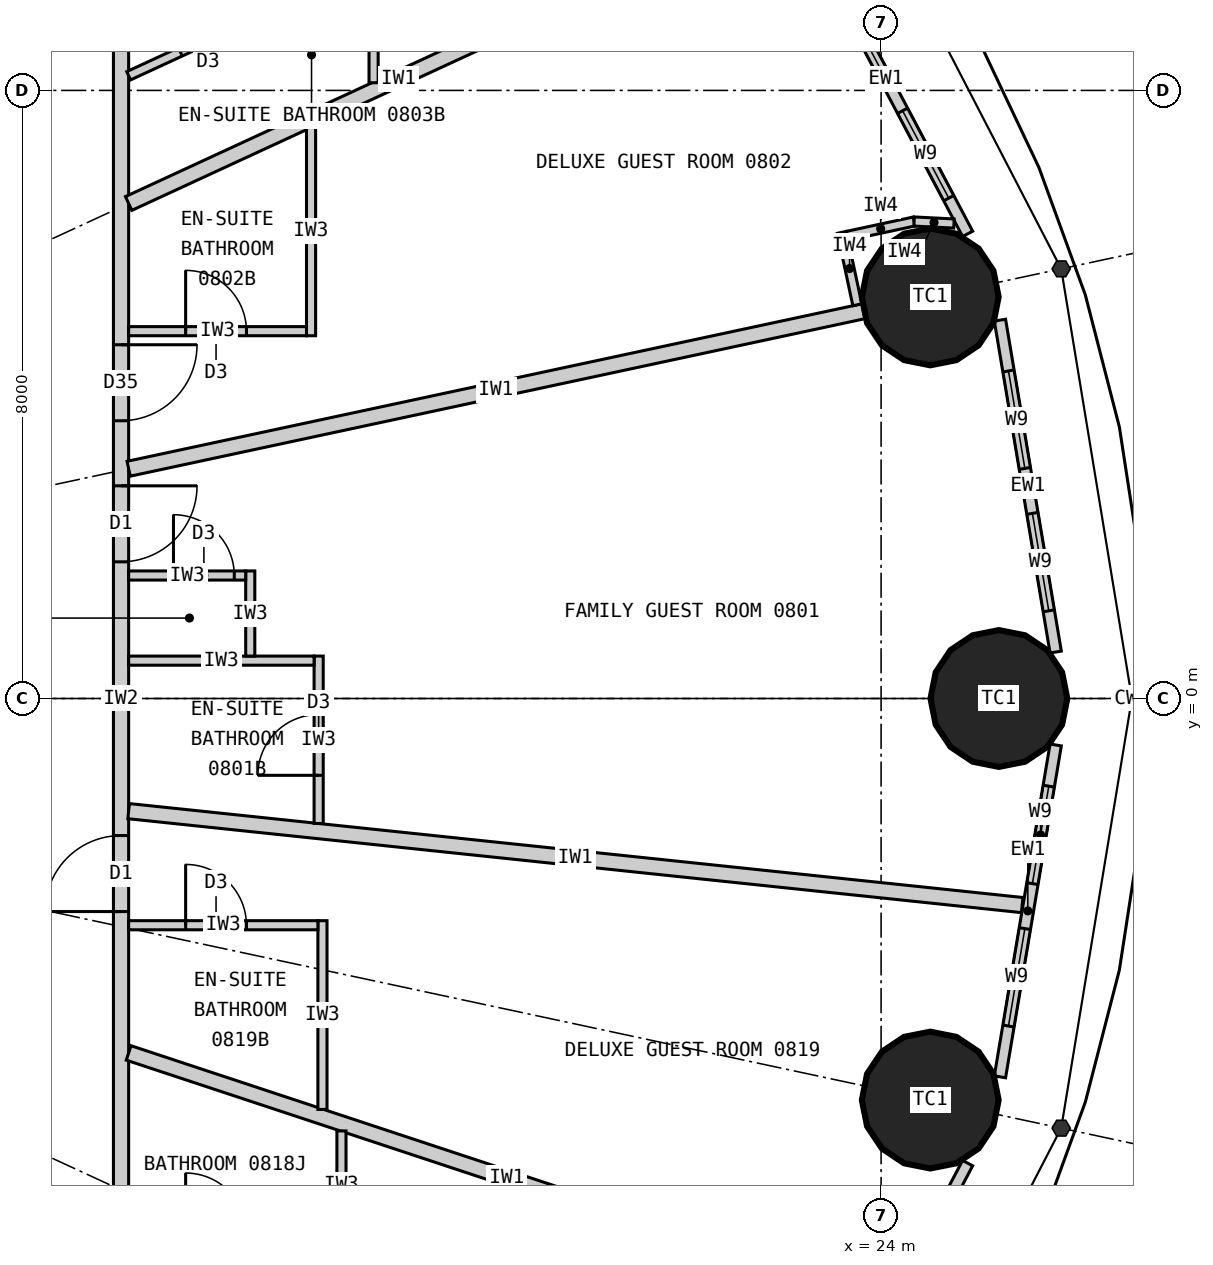
"""IFC4 building model, lengths in metres.
Left out: names, types, materials, properties, quantities, classifications, styles, units other than length and angle.
Written with IfcOpenShell. Run it as: python <this file> out.ifc"""

import sys

from ifc_helpers import new_model, si_unit, direction, frame, frame_2d, origin, origin_2d, place, context, subcontext, project, spatial, rectangle, circle, extrude, element, fill, save


model = new_model("IFC4")
c1 = context("Model", 3, precision=1e-05, world=origin(), true_north=direction((0.0, 1.0)))
c2 = subcontext(c1, "Body", "Model", "MODEL_VIEW")
j1 = project(units=[si_unit("LENGTHUNIT", "METRE"), si_unit("PLANEANGLEUNIT", "RADIAN")], contexts=[c1])
p1 = place(None, origin())
s1 = spatial("IfcSite", under=j1, at=p1, CompositionType="ELEMENT")
p2 = place(p1, origin())
s2 = spatial("IfcBuilding", under=s1, at=p2, CompositionType="ELEMENT")
p3 = place(p2, frame((0.0, 0.0, 39.3)))
s3 = spatial("IfcBuildingStorey", under=s2, at=p3, CompositionType="ELEMENT", Elevation=39.3)
for number, where, z_axis, x_axis in (
    (1, (25.55, 0.0, 0.0), (0.0, 0.0, 1.0), (1.0, 0.0, 0.0)),
    (2, (24.647, 5.283, 0.0), (0.0, 0.0, 1.0), (1.0, 0.0, 0.0)),
    (3, (24.647, -5.283, 0.0), (0.0, 0.0, 1.0), (1.0, 0.0, 0.0)),
):
    element("IfcColumn", number, at=place(p3, frame(where, z_axis=z_axis, x_axis=x_axis)), inside=s3, PredefinedType="COLUMN", context=c2, shape_type="SweptSolid", body=[
        extrude(circle(Radius=0.9, at=origin_2d()), origin(), (0.0, 0.0, 1.0), 3.3),
    ])
p4 = place(p3, frame((26.297, 0.611, 0.0), z_axis=(0.0, 0.0, 1.0), x_axis=(-0.165641751141, 0.986185991727, 0.0)))
e4 = element("IfcWall", 4, at=p4, inside=s3, PredefinedType="ELEMENTEDWALL", context=c2, shape_type="SweptSolid", body=[
    extrude(rectangle(XDim=4.428, YDim=0.15, at=frame_2d((2.214, 0.0))), origin(), (0.0, 0.0, 1.0), 3.12),
])
p5 = place(p4, frame((0.55, 0.0, 0.9)))
e5 = element("IfcOpeningElement", 5, at=p5, cuts=e4, PredefinedType="OPENING", context=c2, shape_type="SweptSolid", body=[
    extrude(rectangle(XDim=1.3, YDim=1.9, at=frame_2d((0.65, 0.95))), frame((0.0, 0.085, 0.0), z_axis=(0.0, -1.0, 0.0), x_axis=(1.0, 0.0, 0.0)), (0.0, 0.0, 1.0), 0.17),
])
p6 = place(p4, frame((2.45, 0.0, 0.9)))
e6 = element("IfcOpeningElement", 6, at=p6, cuts=e4, PredefinedType="OPENING", context=c2, shape_type="SweptSolid", body=[
    extrude(rectangle(XDim=1.3, YDim=1.9, at=frame_2d((0.65, 0.95))), frame((0.0, 0.085, 0.0), z_axis=(0.0, -1.0, 0.0), x_axis=(1.0, 0.0, 0.0)), (0.0, 0.0, 1.0), 0.17),
])
p7 = place(p3, frame((25.139, 6.113, 0.0), z_axis=(0.0, 0.0, 1.0), x_axis=(-0.467303182954, 0.884097129959, 0.0)))
e7 = element("IfcWall", 7, at=p7, inside=s3, PredefinedType="ELEMENTEDWALL", context=c2, shape_type="SweptSolid", body=[
    extrude(rectangle(XDim=4.606, YDim=0.15, at=frame_2d((2.303, 0.0))), origin(), (0.0, 0.0, 1.0), 3.12),
])
p8 = place(p7, frame((0.531, 0.0, 0.9)))
e8 = element("IfcOpeningElement", 8, at=p8, cuts=e7, PredefinedType="OPENING", context=c2, shape_type="SweptSolid", body=[
    extrude(rectangle(XDim=1.3, YDim=1.9, at=frame_2d((0.65, 0.95))), frame((0.0, 0.085, 0.0), z_axis=(0.0, -1.0, 0.0), x_axis=(1.0, 0.0, 0.0)), (0.0, 0.0, 1.0), 0.17),
])
p9 = place(p7, frame((2.432, 0.0, 0.9)))
e9 = element("IfcOpeningElement", 9, at=p9, cuts=e7, PredefinedType="OPENING", context=c2, shape_type="SweptSolid", body=[
    extrude(rectangle(XDim=1.3, YDim=1.9, at=frame_2d((0.65, 0.95))), frame((0.0, 0.085, 0.0), z_axis=(0.0, -1.0, 0.0), x_axis=(1.0, 0.0, 0.0)), (0.0, 0.0, 1.0), 0.17),
])
p10 = place(p3, frame((22.986, -10.185, 0.0), z_axis=(0.0, 0.0, 1.0), x_axis=(0.467303182954, 0.884097129959, 0.0)))
e10 = element("IfcWall", 10, at=p10, inside=s3, PredefinedType="ELEMENTEDWALL", context=c2, shape_type="SweptSolid", body=[
    extrude(rectangle(XDim=4.606, YDim=0.15, at=frame_2d((2.303, 0.0))), origin(), (0.0, 0.0, 1.0), 3.12),
])
p11 = place(p10, frame((0.875, 0.0, 0.9)))
e11 = element("IfcOpeningElement", 11, at=p11, cuts=e10, PredefinedType="OPENING", context=c2, shape_type="SweptSolid", body=[
    extrude(rectangle(XDim=1.3, YDim=1.9, at=frame_2d((0.65, 0.95))), frame((0.0, 0.085, 0.0), z_axis=(0.0, -1.0, 0.0), x_axis=(1.0, 0.0, 0.0)), (0.0, 0.0, 1.0), 0.17),
])
p12 = place(p10, frame((2.775, 0.0, 0.9)))
e12 = element("IfcOpeningElement", 12, at=p12, cuts=e10, PredefinedType="OPENING", context=c2, shape_type="SweptSolid", body=[
    extrude(rectangle(XDim=1.3, YDim=1.9, at=frame_2d((0.65, 0.95))), frame((0.0, 0.085, 0.0), z_axis=(0.0, -1.0, 0.0), x_axis=(1.0, 0.0, 0.0)), (0.0, 0.0, 1.0), 0.17),
])
p13 = place(p3, frame((25.564, -4.978, 0.0), z_axis=(0.0, 0.0, 1.0), x_axis=(0.165641751141, 0.986185991727, 0.0)))
e13 = element("IfcWall", 13, at=p13, inside=s3, PredefinedType="ELEMENTEDWALL", context=c2, shape_type="SweptSolid", body=[
    extrude(rectangle(XDim=4.428, YDim=0.15, at=frame_2d((2.214, 0.0))), origin(), (0.0, 0.0, 1.0), 3.12),
])
p14 = place(p13, frame((0.678, 0.0, 0.9)))
e14 = element("IfcOpeningElement", 14, at=p14, cuts=e13, PredefinedType="OPENING", context=c2, shape_type="SweptSolid", body=[
    extrude(rectangle(XDim=1.3, YDim=1.9, at=frame_2d((0.65, 0.95))), frame((0.0, 0.085, 0.0), z_axis=(0.0, -1.0, 0.0), x_axis=(1.0, 0.0, 0.0)), (0.0, 0.0, 1.0), 0.17),
])
p15 = place(p13, frame((2.578, 0.0, 0.9)))
e15 = element("IfcOpeningElement", 15, at=p15, cuts=e13, PredefinedType="OPENING", context=c2, shape_type="SweptSolid", body=[
    extrude(rectangle(XDim=1.3, YDim=1.9, at=frame_2d((0.65, 0.95))), frame((0.0, 0.085, 0.0), z_axis=(0.0, -1.0, 0.0), x_axis=(1.0, 0.0, 0.0)), (0.0, 0.0, 1.0), 0.17),
])
p16 = place(p3, frame((14.0, -9.9, 0.0), z_axis=(0.0, 0.0, 1.0), x_axis=(0.0, 1.0, 0.0)))
e16 = element("IfcWall", 16, at=p16, inside=s3, PredefinedType="PARTITIONING", context=c2, shape_type="SweptSolid", body=[
    extrude(rectangle(XDim=19.8, YDim=0.2, at=frame_2d((9.9, 0.0))), origin(), (0.0, 0.0, 1.0), 3.12),
])
p17 = place(p16, frame((11.698, 0.0, 0.0)))
e17 = element("IfcOpeningElement", 17, at=p17, cuts=e16, PredefinedType="OPENING", context=c2, shape_type="SweptSolid", body=[
    extrude(rectangle(XDim=1.0, YDim=2.2, at=frame_2d((0.5, 1.1))), frame((0.0, 0.11, 0.0), z_axis=(0.0, -1.0, 0.0), x_axis=(1.0, 0.0, 0.0)), (0.0, 0.0, 1.0), 0.22),
])
p18 = place(p16, frame((13.554, 0.0, 0.0)))
e18 = element("IfcOpeningElement", 18, at=p18, cuts=e16, PredefinedType="OPENING", context=c2, shape_type="SweptSolid", body=[
    extrude(rectangle(XDim=1.0, YDim=2.0, at=frame_2d((0.5, 1.0))), frame((0.0, 0.11, 0.0), z_axis=(0.0, -1.0, 0.0), x_axis=(1.0, 0.0, 0.0)), (0.0, 0.0, 1.0), 0.22),
])
p19 = place(p16, frame((18.698, 0.0, 0.0)))
e19 = element("IfcOpeningElement", 19, at=p19, cuts=e16, PredefinedType="OPENING", context=c2, shape_type="SweptSolid", body=[
    extrude(rectangle(XDim=1.0, YDim=2.2, at=frame_2d((0.5, 1.1))), frame((0.0, 0.11, 0.0), z_axis=(0.0, -1.0, 0.0), x_axis=(1.0, 0.0, 0.0)), (0.0, 0.0, 1.0), 0.22),
])
p20 = place(p16, frame((0.975, 0.0, 0.0)))
e20 = element("IfcOpeningElement", 20, at=p20, cuts=e16, PredefinedType="OPENING", context=c2, shape_type="SweptSolid", body=[
    extrude(rectangle(XDim=1.0, YDim=2.2, at=frame_2d((0.5, 1.1))), frame((0.0, 0.11, 0.0), z_axis=(0.0, -1.0, 0.0), x_axis=(1.0, 0.0, 0.0)), (0.0, 0.0, 1.0), 0.22),
])
p21 = place(p16, frame((7.097, 0.0, 0.0)))
e21 = element("IfcOpeningElement", 21, at=p21, cuts=e16, PredefinedType="OPENING", context=c2, shape_type="SweptSolid", body=[
    extrude(rectangle(XDim=1.0, YDim=2.2, at=frame_2d((0.5, 1.1))), frame((0.0, 0.11, 0.0), z_axis=(0.0, -1.0, 0.0), x_axis=(1.0, 0.0, 0.0)), (0.0, 0.0, 1.0), 0.22),
])
p22 = place(p3, frame((14.1, 3.022, 0.0), z_axis=(0.0, 0.0, 1.0), x_axis=(0.977786510688, 0.209603290805, 0.0)))
e22 = element("IfcWall", 22, at=p22, inside=s3, PredefinedType="PARTITIONING", context=c2, shape_type="SweptSolid", body=[
    extrude(rectangle(XDim=9.887, YDim=0.2, at=frame_2d((4.943, 0.0))), origin(), (0.0, 0.0, 1.0), 2.32),
])
p23 = place(p3, frame((14.1, 6.512, 0.0), z_axis=(0.0, 0.0, 1.0), x_axis=(0.907842433118, 0.41931147925, 0.0)))
e23 = element("IfcWall", 23, at=p23, inside=s3, PredefinedType="PARTITIONING", context=c2, shape_type="SweptSolid", body=[
    extrude(rectangle(XDim=7.823, YDim=0.2, at=frame_2d((3.912, 0.0))), origin(), (0.0, 0.0, 1.0), 2.32),
])
p24 = place(p3, frame((14.1, -4.663, 0.0), z_axis=(0.0, 0.0, 1.0), x_axis=(0.949432655039, -0.31397075269, 0.0)))
e24 = element("IfcWall", 24, at=p24, inside=s3, PredefinedType="PARTITIONING", context=c2, shape_type="SweptSolid", body=[
    extrude(rectangle(XDim=10.486, YDim=0.2, at=frame_2d((5.243, 0.0))), origin(), (0.0, 0.0, 1.0), 3.12),
])
p25 = place(p3, frame((14.1, -1.482, 0.0), z_axis=(0.0, 0.0, 1.0), x_axis=(0.994522076235, -0.104526742422, 0.0)))
e25 = element("IfcWall", 25, at=p25, inside=s3, PredefinedType="PARTITIONING", context=c2, shape_type="SweptSolid", body=[
    extrude(rectangle(XDim=11.821, YDim=0.2, at=frame_2d((5.91, 0.0))), origin(), (0.0, 0.0, 1.0), 2.32),
])
p26 = place(p3, frame((16.6, -1.645, 0.0), z_axis=(0.0, 0.0, 1.0), x_axis=(0.0, 1.0, 0.0)))
e26 = element("IfcWall", 26, at=p26, inside=s3, PredefinedType="PARTITIONING", context=c2, shape_type="SweptSolid", body=[
    extrude(rectangle(XDim=2.203, YDim=0.12, at=frame_2d((1.102, 0.0))), origin(), (0.0, 0.0, 1.0), 3.12),
])
p27 = place(p26, frame((0.634, 0.0, 0.0)))
e27 = element("IfcOpeningElement", 27, at=p27, cuts=e26, PredefinedType="OPENING", context=c2, shape_type="SweptSolid", body=[
    extrude(rectangle(XDim=0.8, YDim=2.1, at=frame_2d((0.4, 1.05))), frame((0.0, 0.07, 0.0), z_axis=(0.0, -1.0, 0.0), x_axis=(1.0, 0.0, 0.0)), (0.0, 0.0, 1.0), 0.14),
])
p28 = place(p3, frame((14.1, 0.498, 0.0), z_axis=(0.0, 0.0, 1.0), x_axis=(1.0, 0.0, 0.0)))
e28 = element("IfcWall", 28, at=p28, inside=s3, PredefinedType="PARTITIONING", context=c2, shape_type="SweptSolid", body=[
    extrude(rectangle(XDim=2.44, YDim=0.12, at=frame_2d((1.22, 0.0))), origin(), (0.0, 0.0, 1.0), 3.12),
])
p29 = place(p3, frame((15.7, 0.558, 0.0), z_axis=(0.0, 0.0, 1.0), x_axis=(0.0, 1.0, 0.0)))
e29 = element("IfcWall", 29, at=p29, inside=s3, PredefinedType="PARTITIONING", context=c2, shape_type="SweptSolid", body=[
    extrude(rectangle(XDim=1.12, YDim=0.12, at=frame_2d((0.56, 0.0))), origin(), (0.0, 0.0, 1.0), 3.12),
])
p30 = place(p3, frame((14.1, 1.618, 0.0), z_axis=(0.0, 0.0, 1.0), x_axis=(1.0, 0.0, 0.0)))
e30 = element("IfcWall", 30, at=p30, inside=s3, PredefinedType="PARTITIONING", context=c2, shape_type="SweptSolid", body=[
    extrude(rectangle(XDim=1.54, YDim=0.12, at=frame_2d((0.77, 0.0))), origin(), (0.0, 0.0, 1.0), 2.32),
])
p31 = place(p30, frame((0.59, 0.0, 0.0)))
e31 = element("IfcOpeningElement", 31, at=p31, cuts=e30, PredefinedType="OPENING", context=c2, shape_type="SweptSolid", body=[
    extrude(rectangle(XDim=0.8, YDim=2.1, at=frame_2d((0.4, 1.05))), frame((0.0, 0.07, 0.0), z_axis=(0.0, -1.0, 0.0), x_axis=(1.0, 0.0, 0.0)), (0.0, 0.0, 1.0), 0.14),
])
p32 = place(p3, frame((16.5, 7.521, 0.0), z_axis=(0.0, 0.0, 1.0), x_axis=(0.0, -1.0, 0.0)))
e32 = element("IfcWall", 32, at=p32, inside=s3, PredefinedType="PARTITIONING", context=c2, shape_type="SweptSolid", body=[
    extrude(rectangle(XDim=2.749, YDim=0.12, at=frame_2d((1.374, 0.0))), origin(), (0.0, 0.0, 1.0), 3.12),
])
p33 = place(p3, frame((14.1, 4.833, 0.0), z_axis=(0.0, 0.0, 1.0), x_axis=(1.0, 0.0, 0.0)))
e33 = element("IfcWall", 33, at=p33, inside=s3, PredefinedType="PARTITIONING", context=c2, shape_type="SweptSolid", body=[
    extrude(rectangle(XDim=2.34, YDim=0.12, at=frame_2d((1.17, 0.0))), origin(), (0.0, 0.0, 1.0), 3.12),
])
p34 = place(p33, frame((0.75, 0.0, 0.0)))
e34 = element("IfcOpeningElement", 34, at=p34, cuts=e33, PredefinedType="OPENING", context=c2, shape_type="SweptSolid", body=[
    extrude(rectangle(XDim=0.8, YDim=2.1, at=frame_2d((0.4, 1.05))), frame((0.0, 0.07, 0.0), z_axis=(0.0, -1.0, 0.0), x_axis=(1.0, 0.0, 0.0)), (0.0, 0.0, 1.0), 0.14),
])
p35 = place(p3, frame((17.323, 8.101, 0.0), z_axis=(0.0, 0.0, 1.0), x_axis=(0.0, 1.0, 0.0)))
e35 = element("IfcWall", 35, at=p35, inside=s3, PredefinedType="PARTITIONING", context=c2, shape_type="SweptSolid", body=[
    extrude(rectangle(XDim=1.64, YDim=0.12, at=frame_2d((0.82, 0.0))), origin(), (0.0, 0.0, 1.0), 3.12),
])
p36 = place(p3, frame((14.1, 8.193, 0.0), z_axis=(0.0, 0.0, 1.0), x_axis=(0.907836493557, 0.419324338628, 0.0)))
e36 = element("IfcWall", 36, at=p36, inside=s3, PredefinedType="PARTITIONING", context=c2, shape_type="SweptSolid", body=[
    extrude(rectangle(XDim=3.49, YDim=0.12, at=frame_2d((1.745, 0.0))), origin(), (0.0, 0.0, 1.0), 3.12),
])
p37 = place(p36, frame((0.75, 0.0, 0.0)))
e37 = element("IfcOpeningElement", 37, at=p37, cuts=e36, PredefinedType="OPENING", context=c2, shape_type="SweptSolid", body=[
    extrude(rectangle(XDim=0.8, YDim=2.1, at=frame_2d((0.4, 1.05))), frame((0.0, 0.07, 0.0), z_axis=(0.0, -1.0, 0.0), x_axis=(1.0, 0.0, 0.0)), (0.0, 0.0, 1.0), 0.14),
])
p38 = place(p3, frame((16.9, -5.689, 0.0), z_axis=(0.0, 0.0, 1.0), x_axis=(0.0, -1.0, 0.0)))
e38 = element("IfcWall", 38, at=p38, inside=s3, PredefinedType="PARTITIONING", context=c2, shape_type="SweptSolid", body=[
    extrude(rectangle(XDim=1.414, YDim=0.12, at=frame_2d((0.707, 0.0))), origin(), (0.0, 0.0, 1.0), 3.12),
])
p39 = place(p3, frame((16.65, -5.406, 0.0), z_axis=(0.0, 0.0, 1.0), x_axis=(0.0, 1.0, 0.0)))
e39 = element("IfcWall", 39, at=p39, inside=s3, PredefinedType="PARTITIONING", context=c2, shape_type="SweptSolid", body=[
    extrude(rectangle(XDim=2.483, YDim=0.12, at=frame_2d((1.242, 0.0))), origin(), (0.0, 0.0, 1.0), 3.12),
])
p40 = place(p3, frame((14.1, -2.983, 0.0), z_axis=(0.0, 0.0, 1.0), x_axis=(1.0, 0.0, 0.0)))
e40 = element("IfcWall", 40, at=p40, inside=s3, PredefinedType="PARTITIONING", context=c2, shape_type="SweptSolid", body=[
    extrude(rectangle(XDim=2.49, YDim=0.12, at=frame_2d((1.245, 0.0))), origin(), (0.0, 0.0, 1.0), 3.12),
])
p41 = place(p40, frame((0.75, 0.0, 0.0)))
e41 = element("IfcOpeningElement", 41, at=p41, cuts=e40, PredefinedType="OPENING", context=c2, shape_type="SweptSolid", body=[
    extrude(rectangle(XDim=0.8, YDim=2.1, at=frame_2d((0.4, 1.05))), frame((0.0, 0.07, 0.0), z_axis=(0.0, -1.0, 0.0), x_axis=(1.0, 0.0, 0.0)), (0.0, 0.0, 1.0), 0.14),
])
p42 = place(p3, frame((23.687, 5.18, 0.0), z_axis=(0.0, 0.0, 1.0), x_axis=(-0.209443540911, 0.977820741839, 0.0)))
e42 = element("IfcWall", 42, at=p42, inside=s3, PredefinedType="PARTITIONING", context=c2, shape_type="SweptSolid", body=[
    extrude(rectangle(XDim=0.975, YDim=0.12, at=frame_2d((0.487, 0.0))), origin(), (0.0, 0.0, 1.0), 3.12),
])
p43 = place(p3, frame((23.554, 6.087, 0.0), z_axis=(0.0, 0.0, 1.0), x_axis=(0.977762694187, 0.209714362543, 0.0)))
e43 = element("IfcWall", 43, at=p43, inside=s3, PredefinedType="PARTITIONING", context=c2, shape_type="SweptSolid", body=[
    extrude(rectangle(XDim=0.9, YDim=0.12, at=frame_2d((0.45, 0.0))), origin(), (0.0, 0.0, 1.0), 3.12),
])
p44 = place(p3, frame((24.434, 6.275, 0.0), z_axis=(0.0, 0.0, 1.0), x_axis=(0.998714959873, -0.050679669751, 0.0)))
e44 = element("IfcWall", 44, at=p44, inside=s3, PredefinedType="PARTITIONING", context=c2, shape_type="SweptSolid", body=[
    extrude(rectangle(XDim=0.525, YDim=0.12, at=frame_2d((0.263, 0.0))), origin(), (0.0, 0.0, 1.0), 3.12),
])
p45 = place(p5, origin())
e45 = element("IfcWindow", 45, at=p45, inside=s3, PartitioningType="SINGLE_PANEL", PredefinedType="WINDOW", context=c2, shape_type="SweptSolid", body=[
    extrude(rectangle(XDim=1.3, YDim=1.9, at=frame_2d((0.65, 0.95))), frame((0.0, 0.03, 0.0), z_axis=(0.0, -1.0, 0.0), x_axis=(1.0, 0.0, 0.0)), (0.0, 0.0, 1.0), 0.06),
])
fill(e5, e45)
p46 = place(p6, origin())
e46 = element("IfcWindow", 46, at=p46, inside=s3, PartitioningType="SINGLE_PANEL", PredefinedType="WINDOW", context=c2, shape_type="SweptSolid", body=[
    extrude(rectangle(XDim=1.3, YDim=1.9, at=frame_2d((0.65, 0.95))), frame((0.0, 0.03, 0.0), z_axis=(0.0, -1.0, 0.0), x_axis=(1.0, 0.0, 0.0)), (0.0, 0.0, 1.0), 0.06),
])
fill(e6, e46)
p47 = place(p8, origin())
e47 = element("IfcWindow", 47, at=p47, inside=s3, PartitioningType="SINGLE_PANEL", PredefinedType="WINDOW", context=c2, shape_type="SweptSolid", body=[
    extrude(rectangle(XDim=1.3, YDim=1.9, at=frame_2d((0.65, 0.95))), frame((0.0, 0.03, 0.0), z_axis=(0.0, -1.0, 0.0), x_axis=(1.0, 0.0, 0.0)), (0.0, 0.0, 1.0), 0.06),
])
fill(e8, e47)
p48 = place(p9, origin())
e48 = element("IfcWindow", 48, at=p48, inside=s3, PartitioningType="SINGLE_PANEL", PredefinedType="WINDOW", context=c2, shape_type="SweptSolid", body=[
    extrude(rectangle(XDim=1.3, YDim=1.9, at=frame_2d((0.65, 0.95))), frame((0.0, 0.03, 0.0), z_axis=(0.0, -1.0, 0.0), x_axis=(1.0, 0.0, 0.0)), (0.0, 0.0, 1.0), 0.06),
])
fill(e9, e48)
p49 = place(p14, origin())
e49 = element("IfcWindow", 49, at=p49, inside=s3, PartitioningType="SINGLE_PANEL", PredefinedType="WINDOW", context=c2, shape_type="SweptSolid", body=[
    extrude(rectangle(XDim=1.3, YDim=1.9, at=frame_2d((0.65, 0.95))), frame((0.0, 0.03, 0.0), z_axis=(0.0, -1.0, 0.0), x_axis=(1.0, 0.0, 0.0)), (0.0, 0.0, 1.0), 0.06),
])
fill(e14, e49)
p50 = place(p15, origin())
e50 = element("IfcWindow", 50, at=p50, inside=s3, PartitioningType="SINGLE_PANEL", PredefinedType="WINDOW", context=c2, shape_type="SweptSolid", body=[
    extrude(rectangle(XDim=1.3, YDim=1.9, at=frame_2d((0.65, 0.95))), frame((0.0, 0.03, 0.0), z_axis=(0.0, -1.0, 0.0), x_axis=(1.0, 0.0, 0.0)), (0.0, 0.0, 1.0), 0.06),
])
fill(e15, e50)
p51 = place(p27, origin())
e51 = element("IfcDoor", 51, at=p51, inside=s3, OperationType="SINGLE_SWING_LEFT", PredefinedType="DOOR", context=c2, shape_type="SweptSolid", body=[
    extrude(rectangle(XDim=0.8, YDim=2.1, at=frame_2d((0.4, 1.05))), frame((0.0, 0.025, 0.0), z_axis=(0.0, -1.0, 0.0), x_axis=(1.0, 0.0, 0.0)), (0.0, 0.0, 1.0), 0.05),
])
fill(e27, e51)
p52 = place(p31, origin())
e52 = element("IfcDoor", 52, at=p52, inside=s3, OperationType="SINGLE_SWING_LEFT", PredefinedType="DOOR", context=c2, shape_type="SweptSolid", body=[
    extrude(rectangle(XDim=0.8, YDim=2.1, at=frame_2d((0.4, 1.05))), frame((0.0, 0.025, 0.0), z_axis=(0.0, -1.0, 0.0), x_axis=(1.0, 0.0, 0.0)), (0.0, 0.0, 1.0), 0.05),
])
fill(e31, e52)
p53 = place(p17, origin())
e53 = element("IfcDoor", 53, at=p53, inside=s3, OperationType="SINGLE_SWING_RIGHT", PredefinedType="DOOR", context=c2, shape_type="SweptSolid", body=[
    extrude(rectangle(XDim=1.0, YDim=2.2, at=frame_2d((0.5, 1.1))), frame((0.0, 0.025, 0.0), z_axis=(0.0, -1.0, 0.0), x_axis=(1.0, 0.0, 0.0)), (0.0, 0.0, 1.0), 0.05),
])
fill(e17, e53)
p54 = place(p34, origin())
e54 = element("IfcDoor", 54, at=p54, inside=s3, OperationType="SINGLE_SWING_LEFT", PredefinedType="DOOR", context=c2, shape_type="SweptSolid", body=[
    extrude(rectangle(XDim=0.8, YDim=2.1, at=frame_2d((0.4, 1.05))), frame((0.0, 0.025, 0.0), z_axis=(0.0, -1.0, 0.0), x_axis=(1.0, 0.0, 0.0)), (0.0, 0.0, 1.0), 0.05),
])
fill(e34, e54)
p55 = place(p18, origin())
e55 = element("IfcDoor", 55, at=p55, inside=s3, OperationType="SINGLE_SWING_RIGHT", PredefinedType="DOOR", context=c2, shape_type="SweptSolid", body=[
    extrude(rectangle(XDim=1.0, YDim=2.0, at=frame_2d((0.5, 1.0))), frame((0.0, 0.025, 0.0), z_axis=(0.0, -1.0, 0.0), x_axis=(1.0, 0.0, 0.0)), (0.0, 0.0, 1.0), 0.05),
])
fill(e18, e55)
p56 = place(p37, origin())
e56 = element("IfcDoor", 56, at=p56, inside=s3, OperationType="SINGLE_SWING_LEFT", PredefinedType="DOOR", context=c2, shape_type="SweptSolid", body=[
    extrude(rectangle(XDim=0.8, YDim=2.1, at=frame_2d((0.4, 1.05))), frame((0.0, 0.025, 0.0), z_axis=(0.0, -1.0, 0.0), x_axis=(1.0, 0.0, 0.0)), (0.0, 0.0, 1.0), 0.05),
])
fill(e37, e56)
p57 = place(p41, origin())
e57 = element("IfcDoor", 57, at=p57, inside=s3, OperationType="SINGLE_SWING_LEFT", PredefinedType="DOOR", context=c2, shape_type="SweptSolid", body=[
    extrude(rectangle(XDim=0.8, YDim=2.1, at=frame_2d((0.4, 1.05))), frame((0.0, 0.025, 0.0), z_axis=(0.0, -1.0, 0.0), x_axis=(1.0, 0.0, 0.0)), (0.0, 0.0, 1.0), 0.05),
])
fill(e41, e57)
p58 = place(p21, origin())
e58 = element("IfcDoor", 58, at=p58, inside=s3, OperationType="SINGLE_SWING_LEFT", PredefinedType="DOOR", context=c2, shape_type="SweptSolid", body=[
    extrude(rectangle(XDim=1.0, YDim=2.2, at=frame_2d((0.5, 1.1))), frame((0.0, 0.025, 0.0), z_axis=(0.0, -1.0, 0.0), x_axis=(1.0, 0.0, 0.0)), (0.0, 0.0, 1.0), 0.05),
])
fill(e21, e58)
save(model, sys.argv[1])
